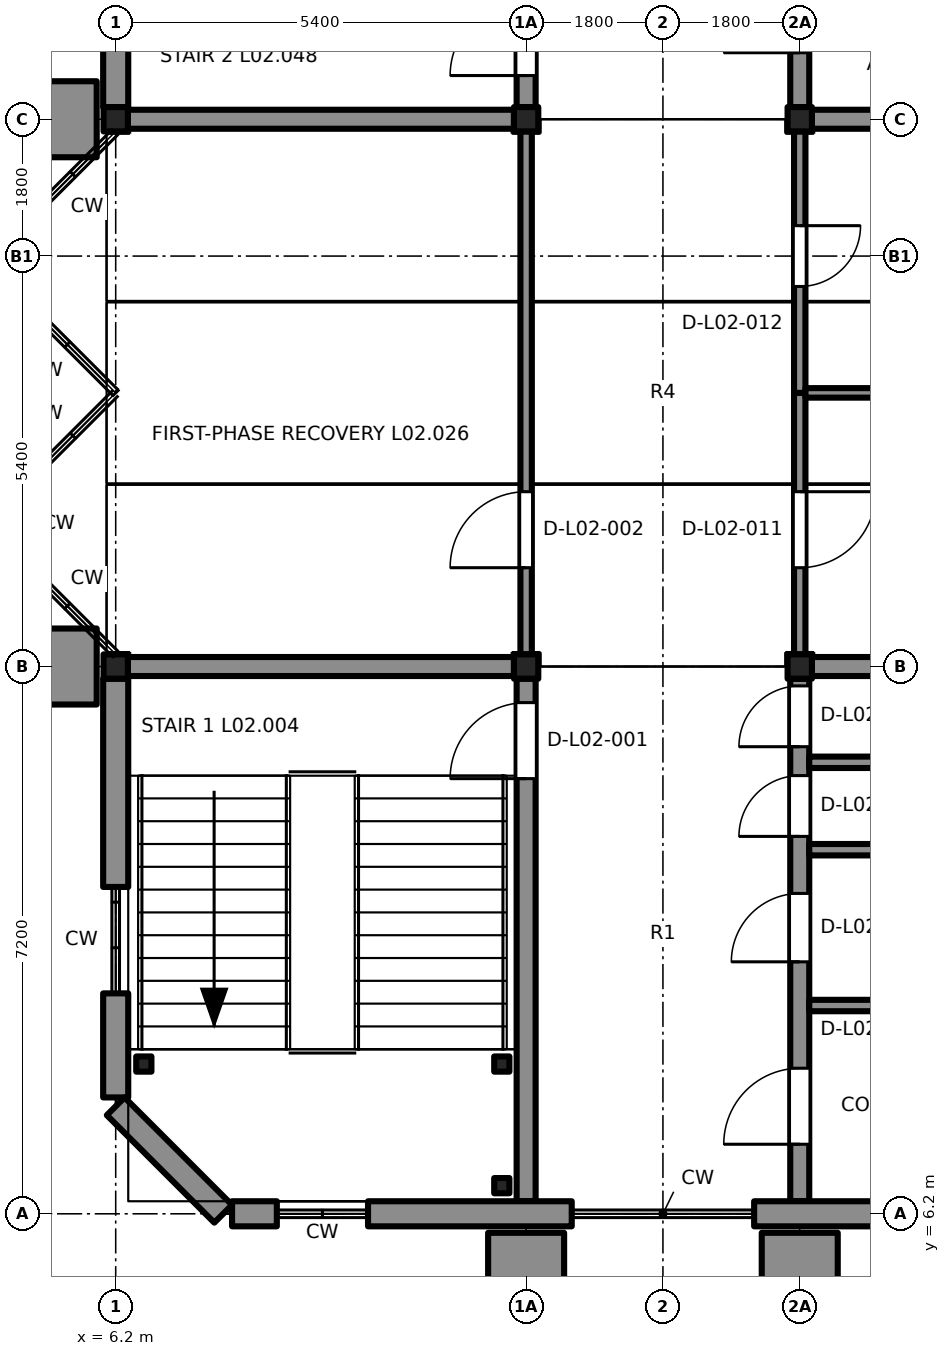
"""IFC4 building model, lengths in metres.
Left out: names, types, materials, properties, quantities, classifications, styles, units other than length and angle.
Written with IfcOpenShell. Run it as: python <this file> out.ifc"""

import sys

from ifc_helpers import new_model, si_unit, direction, frame, frame_2d, origin, origin_2d, place, context, subcontext, project, spatial, rectangle, extrude, element, fill, save


model = new_model("IFC4")
c1 = context("Model", 3, precision=1e-05, world=origin(), true_north=direction((0.0, 1.0)))
c2 = subcontext(c1, "Body", "Model", "MODEL_VIEW")
j1 = project(units=[si_unit("LENGTHUNIT", "METRE"), si_unit("PLANEANGLEUNIT", "RADIAN")], contexts=[c1])
p1 = place(None, origin())
s1 = spatial("IfcSite", under=j1, at=p1, CompositionType="ELEMENT")
p2 = place(p1, origin())
s2 = spatial("IfcBuilding", under=s1, at=p2, CompositionType="ELEMENT")
p3 = place(p2, frame((0.0, 0.0, 10.2)))
s3 = spatial("IfcBuildingStorey", under=s2, at=p3, CompositionType="ELEMENT", Elevation=10.2)
for number, where, z_axis, x_axis in (
    (1, (6.2, 13.4, 0.0), (0.0, 0.0, 1.0), (1.0, 0.0, 0.0)),
    (2, (11.6, 13.4, 0.0), (0.0, 0.0, 1.0), (1.0, 0.0, 0.0)),
    (3, (15.2, 13.4, 0.0), (0.0, 0.0, 1.0), (1.0, 0.0, 0.0)),
    (4, (6.2, 20.6, 0.0), (0.0, 0.0, 1.0), (1.0, 0.0, 0.0)),
    (5, (11.6, 20.6, 0.0), (0.0, 0.0, 1.0), (1.0, 0.0, 0.0)),
    (6, (15.2, 20.6, 0.0), (0.0, 0.0, 1.0), (1.0, 0.0, 0.0)),
):
    element("IfcColumn", number, at=place(p3, frame(where, z_axis=z_axis, x_axis=x_axis)), inside=s3, PredefinedType="COLUMN", context=c2, shape_type="SweptSolid", body=[
        extrude(rectangle(XDim=0.32, YDim=0.32, at=origin_2d()), origin(), (0.0, 0.0, 1.0), 3.9),
    ])
p4 = place(p3, frame((11.6, 6.365, 0.0), z_axis=(0.0, 0.0, 1.0), x_axis=(0.0, 1.0, 0.0)))
e7 = element("IfcWall", 7, at=p4, inside=s3, PredefinedType="SHEAR", context=c2, shape_type="SweptSolid", body=[
    extrude(rectangle(XDim=6.875, YDim=0.25, at=frame_2d((3.438, 0.0))), origin(), (0.0, 0.0, 1.0), 3.65),
])
p5 = place(p4, frame((5.56, 0.0, 0.0)))
e8 = element("IfcOpeningElement", 8, at=p5, cuts=e7, PredefinedType="OPENING", context=c2, shape_type="SweptSolid", body=[
    extrude(rectangle(XDim=1.0, YDim=2.1, at=frame_2d((0.5, 1.05))), frame((0.0, 0.135, 0.0), z_axis=(0.0, -1.0, 0.0), x_axis=(1.0, 0.0, 0.0)), (0.0, 0.0, 1.0), 0.27),
])
p6 = place(p3, frame((6.36, 13.4, 0.0), z_axis=(0.0, 0.0, 1.0), x_axis=(1.0, 0.0, 0.0)))
e9 = element("IfcWall", 9, at=p6, inside=s3, PredefinedType="SHEAR", context=c2, shape_type="SweptSolid", body=[
    extrude(rectangle(XDim=5.08, YDim=0.25, at=frame_2d((2.54, 0.0))), origin(), (0.0, 0.0, 1.0), 3.65),
])
p7 = place(p3, frame((15.2, 6.365, 0.0), z_axis=(0.0, 0.0, 1.0), x_axis=(0.0, 1.0, 0.0)))
e10 = element("IfcWall", 10, at=p7, inside=s3, PredefinedType="SHEAR", context=c2, shape_type="SweptSolid", body=[
    extrude(rectangle(XDim=6.875, YDim=0.25, at=frame_2d((3.438, 0.0))), origin(), (0.0, 0.0, 1.0), 3.65),
])
p8 = place(p7, frame((0.75, 0.0, 0.0)))
e11 = element("IfcOpeningElement", 11, at=p8, cuts=e10, PredefinedType="OPENING", context=c2, shape_type="SweptSolid", body=[
    extrude(rectangle(XDim=1.0, YDim=2.1, at=frame_2d((0.5, 1.05))), frame((0.0, 0.135, 0.0), z_axis=(0.0, -1.0, 0.0), x_axis=(1.0, 0.0, 0.0)), (0.0, 0.0, 1.0), 0.27),
])
p9 = place(p7, frame((3.15, 0.0, 0.0)))
e12 = element("IfcOpeningElement", 12, at=p9, cuts=e10, PredefinedType="OPENING", context=c2, shape_type="SweptSolid", body=[
    extrude(rectangle(XDim=0.9, YDim=2.1, at=frame_2d((0.45, 1.05))), frame((0.0, 0.135, 0.0), z_axis=(0.0, -1.0, 0.0), x_axis=(1.0, 0.0, 0.0)), (0.0, 0.0, 1.0), 0.27),
])
p10 = place(p7, frame((4.8, 0.0, 0.0)))
e13 = element("IfcOpeningElement", 13, at=p10, cuts=e10, PredefinedType="OPENING", context=c2, shape_type="SweptSolid", body=[
    extrude(rectangle(XDim=0.8, YDim=2.1, at=frame_2d((0.4, 1.05))), frame((0.0, 0.135, 0.0), z_axis=(0.0, -1.0, 0.0), x_axis=(1.0, 0.0, 0.0)), (0.0, 0.0, 1.0), 0.27),
])
p11 = place(p7, frame((5.98, 0.0, 0.0)))
e14 = element("IfcOpeningElement", 14, at=p11, cuts=e10, PredefinedType="OPENING", context=c2, shape_type="SweptSolid", body=[
    extrude(rectangle(XDim=0.8, YDim=2.1, at=frame_2d((0.4, 1.05))), frame((0.0, 0.135, 0.0), z_axis=(0.0, -1.0, 0.0), x_axis=(1.0, 0.0, 0.0)), (0.0, 0.0, 1.0), 0.27),
])
p12 = place(p3, frame((15.36, 13.4, 0.0), z_axis=(0.0, 0.0, 1.0), x_axis=(1.0, 0.0, 0.0)))
e15 = element("IfcWall", 15, at=p12, inside=s3, PredefinedType="SHEAR", context=c2, shape_type="SweptSolid", body=[
    extrude(rectangle(XDim=5.08, YDim=0.25, at=frame_2d((2.54, 0.0))), origin(), (0.0, 0.0, 1.0), 3.65),
])
for number, where, z_axis, x_axis in (
    (16, (15.325, 8.94, 0.0), (0.0, 0.0, 1.0), (1.0, 0.0, 0.0)),
    (17, (15.325, 10.99, 0.0), (0.0, 0.0, 1.0), (1.0, 0.0, 0.0)),
    (18, (15.325, 12.14, 0.0), (0.0, 0.0, 1.0), (1.0, 0.0, 0.0)),
):
    element("IfcWall", number, at=place(p3, frame(where, z_axis=z_axis, x_axis=x_axis)), inside=s3, PredefinedType="PARTITIONING", context=c2, shape_type="SweptSolid", body=[
        extrude(rectangle(XDim=5.11, YDim=0.15, at=frame_2d((2.555, 0.0))), origin(), (0.0, 0.0, 1.0), 3.65),
    ])
for number, where, z_axis, x_axis in (
    (19, (11.28, 6.57, 0.0), (0.0, 0.0, 1.0), (1.0, 0.0, 0.0)),
    (20, (6.57, 8.17, 0.0), (0.0, 0.0, 1.0), (1.0, 0.0, 0.0)),
    (21, (11.28, 8.17, 0.0), (0.0, 0.0, 1.0), (1.0, 0.0, 0.0)),
):
    element("IfcColumn", number, at=place(p3, frame(where, z_axis=z_axis, x_axis=x_axis)), inside=s3, PredefinedType="COLUMN", context=c2, shape_type="SweptSolid", body=[
        extrude(rectangle(XDim=0.2, YDim=0.2, at=origin_2d()), origin(), (0.0, 0.0, 1.0), 1.75),
    ])
p13 = place(p3, frame((11.6, 20.76, 0.0), z_axis=(0.0, 0.0, 1.0), x_axis=(0.0, 1.0, 0.0)))
e22 = element("IfcWall", 22, at=p13, inside=s3, PredefinedType="SHEAR", context=c2, shape_type="SweptSolid", body=[
    extrude(rectangle(XDim=6.88, YDim=0.25, at=frame_2d((3.44, 0.0))), origin(), (0.0, 0.0, 1.0), 3.65),
])
p14 = place(p13, frame((0.415, 0.0, 0.0)))
e23 = element("IfcOpeningElement", 23, at=p14, cuts=e22, PredefinedType="OPENING", context=c2, shape_type="SweptSolid", body=[
    extrude(rectangle(XDim=1.0, YDim=2.1, at=frame_2d((0.5, 1.05))), frame((0.0, 0.135, 0.0), z_axis=(0.0, -1.0, 0.0), x_axis=(1.0, 0.0, 0.0)), (0.0, 0.0, 1.0), 0.27),
])
p15 = place(p3, frame((6.36, 20.6, 0.0), z_axis=(0.0, 0.0, 1.0), x_axis=(1.0, 0.0, 0.0)))
e24 = element("IfcWall", 24, at=p15, inside=s3, PredefinedType="SHEAR", context=c2, shape_type="SweptSolid", body=[
    extrude(rectangle(XDim=5.08, YDim=0.25, at=frame_2d((2.54, 0.0))), origin(), (0.0, 0.0, 1.0), 3.65),
])
p16 = place(p3, frame((15.2, 20.76, 0.0), z_axis=(0.0, 0.0, 1.0), x_axis=(0.0, 1.0, 0.0)))
e25 = element("IfcWall", 25, at=p16, inside=s3, PredefinedType="SHEAR", context=c2, shape_type="SweptSolid", body=[
    extrude(rectangle(XDim=6.88, YDim=0.25, at=frame_2d((3.44, 0.0))), origin(), (0.0, 0.0, 1.0), 3.65),
])
p17 = place(p16, frame((0.715, 0.0, 0.0)))
e26 = element("IfcOpeningElement", 26, at=p17, cuts=e25, PredefinedType="OPENING", context=c2, shape_type="SweptSolid", body=[
    extrude(rectangle(XDim=1.0, YDim=2.1, at=frame_2d((0.5, 1.05))), frame((0.0, 0.135, 0.0), z_axis=(0.0, -1.0, 0.0), x_axis=(1.0, 0.0, 0.0)), (0.0, 0.0, 1.0), 0.27),
])
p18 = place(p16, frame((3.115, 0.0, 0.0)))
e27 = element("IfcOpeningElement", 27, at=p18, cuts=e25, PredefinedType="OPENING", context=c2, shape_type="SweptSolid", body=[
    extrude(rectangle(XDim=0.9, YDim=2.1, at=frame_2d((0.45, 1.05))), frame((0.0, 0.135, 0.0), z_axis=(0.0, -1.0, 0.0), x_axis=(1.0, 0.0, 0.0)), (0.0, 0.0, 1.0), 0.27),
])
p19 = place(p16, frame((4.765, 0.0, 0.0)))
e28 = element("IfcOpeningElement", 28, at=p19, cuts=e25, PredefinedType="OPENING", context=c2, shape_type="SweptSolid", body=[
    extrude(rectangle(XDim=0.8, YDim=2.1, at=frame_2d((0.4, 1.05))), frame((0.0, 0.135, 0.0), z_axis=(0.0, -1.0, 0.0), x_axis=(1.0, 0.0, 0.0)), (0.0, 0.0, 1.0), 0.27),
])
p20 = place(p16, frame((5.965, 0.0, 0.0)))
e29 = element("IfcOpeningElement", 29, at=p20, cuts=e25, PredefinedType="OPENING", context=c2, shape_type="SweptSolid", body=[
    extrude(rectangle(XDim=0.8, YDim=2.1, at=frame_2d((0.4, 1.05))), frame((0.0, 0.135, 0.0), z_axis=(0.0, -1.0, 0.0), x_axis=(1.0, 0.0, 0.0)), (0.0, 0.0, 1.0), 0.27),
])
p21 = place(p3, frame((15.36, 20.6, 0.0), z_axis=(0.0, 0.0, 1.0), x_axis=(1.0, 0.0, 0.0)))
e30 = element("IfcWall", 30, at=p21, inside=s3, PredefinedType="SHEAR", context=c2, shape_type="SweptSolid", body=[
    extrude(rectangle(XDim=5.08, YDim=0.25, at=frame_2d((2.54, 0.0))), origin(), (0.0, 0.0, 1.0), 3.65),
])
p22 = place(p3, frame((6.2, 7.731, 0.0), z_axis=(0.0, 0.0, 1.0), x_axis=(0.0, 1.0, 0.0)))
e31 = element("IfcWall", 31, at=p22, inside=s3, PredefinedType="SOLIDWALL", context=c2, shape_type="SweptSolid", body=[
    extrude(rectangle(XDim=1.369, YDim=0.33, at=frame_2d((0.685, 0.0))), origin(), (0.0, 0.0, 1.0), 3.22),
])
for number, where, z_axis, x_axis in (
    (32, (6.2, 10.5, 0.0), (0.0, 0.0, 1.0), (0.0, 1.0, 0.0)),
    (33, (6.2, 20.76, 0.0), (0.0, 0.0, 1.0), (0.0, 1.0, 0.0)),
):
    element("IfcWall", number, at=place(p3, frame(where, z_axis=z_axis, x_axis=x_axis)), inside=s3, PredefinedType="SOLIDWALL", context=c2, shape_type="SweptSolid", body=[
        extrude(rectangle(XDim=2.74, YDim=0.33, at=frame_2d((1.37, 0.0))), origin(), (0.0, 0.0, 1.0), 3.22),
    ])
for number, where, z_axis, x_axis in (
    (34, (5.575, 12.9, 0.0), (0.0, 0.0, 1.0), (0.0, 1.0, 0.0)),
    (35, (5.575, 20.1, 0.0), (0.0, 0.0, 1.0), (0.0, 1.0, 0.0)),
):
    element("IfcWall", number, at=place(p3, frame(where, z_axis=z_axis, x_axis=x_axis)), inside=s3, PredefinedType="SOLIDWALL", context=c2, shape_type="SweptSolid", body=[
        extrude(rectangle(XDim=1.0, YDim=0.75, at=frame_2d((0.5, 0.0))), origin(), (0.0, 0.0, 1.0), 3.9),
    ])
p23 = place(p3, frame((8.32, 6.2, 0.0), z_axis=(0.0, 0.0, 1.0), x_axis=(-1.0, 0.0, 0.0)))
e36 = element("IfcWall", 36, at=p23, inside=s3, PredefinedType="SOLIDWALL", context=c2, shape_type="SweptSolid", body=[
    extrude(rectangle(XDim=0.589, YDim=0.33, at=frame_2d((0.294, 0.0))), origin(), (0.0, 0.0, 1.0), 3.2),
])
p24 = place(p3, frame((12.2, 6.2, 0.0), z_axis=(0.0, 0.0, 1.0), x_axis=(-1.0, 0.0, 0.0)))
e37 = element("IfcWall", 37, at=p24, inside=s3, PredefinedType="SOLIDWALL", context=c2, shape_type="SweptSolid", body=[
    extrude(rectangle(XDim=2.68, YDim=0.33, at=frame_2d((1.34, 0.0))), origin(), (0.0, 0.0, 1.0), 3.2),
])
p25 = place(p3, frame((20.435, 6.2, 0.0), z_axis=(0.0, 0.0, 1.0), x_axis=(-1.0, 0.0, 0.0)))
e38 = element("IfcWall", 38, at=p25, inside=s3, PredefinedType="SOLIDWALL", context=c2, shape_type="SweptSolid", body=[
    extrude(rectangle(XDim=5.835, YDim=0.33, at=frame_2d((2.917, 0.0))), origin(), (0.0, 0.0, 1.0), 3.2),
])
for number, where, z_axis, x_axis in (
    (39, (12.1, 5.575, 0.0), (0.0, 0.0, 1.0), (-1.0, 0.0, 0.0)),
    (40, (15.7, 5.575, 0.0), (0.0, 0.0, 1.0), (-1.0, 0.0, 0.0)),
):
    element("IfcWall", number, at=place(p3, frame(where, z_axis=z_axis, x_axis=x_axis)), inside=s3, PredefinedType="SOLIDWALL", context=c2, shape_type="SweptSolid", body=[
        extrude(rectangle(XDim=1.0, YDim=0.75, at=frame_2d((0.5, 0.0))), origin(), (0.0, 0.0, 1.0), 3.9),
    ])
p26 = place(p3, frame((6.2, 7.614, 0.0), z_axis=(0.0, 0.0, 1.0), x_axis=(0.707106781187, -0.707106781187, 0.0)))
e41 = element("IfcWall", 41, at=p26, inside=s3, PredefinedType="SOLIDWALL", context=c2, shape_type="SweptSolid", body=[
    extrude(rectangle(XDim=2.0, YDim=0.33, at=frame_2d((1.0, 0.0))), origin(), (0.0, 0.0, 1.0), 3.2),
])
p27 = place(p3, frame((11.6, 13.56, 0.0), z_axis=(0.0, 0.0, 1.0), x_axis=(0.0, 1.0, 0.0)))
e42 = element("IfcWall", 42, at=p27, inside=s3, PredefinedType="PARTITIONING", context=c2, shape_type="SweptSolid", body=[
    extrude(rectangle(XDim=6.88, YDim=0.15, at=frame_2d((3.44, 0.0))), origin(), (0.0, 0.0, 1.0), 3.22),
])
p28 = place(p27, frame((1.14, 0.0, 0.0)))
e43 = element("IfcOpeningElement", 43, at=p28, cuts=e42, PredefinedType="OPENING", context=c2, shape_type="SweptSolid", body=[
    extrude(rectangle(XDim=1.0, YDim=2.1, at=frame_2d((0.5, 1.05))), frame((0.0, 0.085, 0.0), z_axis=(0.0, -1.0, 0.0), x_axis=(1.0, 0.0, 0.0)), (0.0, 0.0, 1.0), 0.17),
])
p29 = place(p3, frame((15.2, 17.0, 0.0), z_axis=(0.0, 0.0, 1.0), x_axis=(0.0, -1.0, 0.0)))
e44 = element("IfcWall", 44, at=p29, inside=s3, PredefinedType="PARTITIONING", context=c2, shape_type="SweptSolid", body=[
    extrude(rectangle(XDim=3.44, YDim=0.15, at=frame_2d((1.72, 0.0))), origin(), (0.0, 0.0, 1.0), 3.22),
])
p30 = place(p29, frame((1.3, 0.0, 0.0)))
e45 = element("IfcOpeningElement", 45, at=p30, cuts=e44, PredefinedType="OPENING", context=c2, shape_type="SweptSolid", body=[
    extrude(rectangle(XDim=1.0, YDim=2.1, at=frame_2d((0.5, 1.05))), frame((0.0, 0.085, 0.0), z_axis=(0.0, -1.0, 0.0), x_axis=(1.0, 0.0, 0.0)), (0.0, 0.0, 1.0), 0.17),
])
p31 = place(p3, frame((15.2, 20.44, 0.0), z_axis=(0.0, 0.0, 1.0), x_axis=(0.0, -1.0, 0.0)))
e46 = element("IfcWall", 46, at=p31, inside=s3, PredefinedType="PARTITIONING", context=c2, shape_type="SweptSolid", body=[
    extrude(rectangle(XDim=3.44, YDim=0.15, at=frame_2d((1.72, 0.0))), origin(), (0.0, 0.0, 1.0), 3.22),
])
p32 = place(p31, frame((1.24, 0.0, 0.0)))
e47 = element("IfcOpeningElement", 47, at=p32, cuts=e46, PredefinedType="OPENING", context=c2, shape_type="SweptSolid", body=[
    extrude(rectangle(XDim=0.8, YDim=2.1, at=frame_2d((0.4, 1.05))), frame((0.0, 0.085, 0.0), z_axis=(0.0, -1.0, 0.0), x_axis=(1.0, 0.0, 0.0)), (0.0, 0.0, 1.0), 0.17),
])
p33 = place(p3, frame((20.435, 17.0, 0.0), z_axis=(0.0, 0.0, 1.0), x_axis=(-1.0, 0.0, 0.0)))
e48 = element("IfcWall", 48, at=p33, inside=s3, PredefinedType="PARTITIONING", context=c2, shape_type="SweptSolid", body=[
    extrude(rectangle(XDim=5.16, YDim=0.125, at=frame_2d((2.58, 0.0))), origin(), (0.0, 0.0, 1.0), 3.38),
])
p34 = place(p5, origin())
e49 = element("IfcDoor", 49, at=p34, inside=s3, OperationType="SINGLE_SWING_LEFT", PredefinedType="DOOR", context=c2, shape_type="SweptSolid", body=[
    extrude(rectangle(XDim=1.0, YDim=2.1, at=frame_2d((0.5, 1.05))), frame((0.0, 0.025, 0.0), z_axis=(0.0, -1.0, 0.0), x_axis=(1.0, 0.0, 0.0)), (0.0, 0.0, 1.0), 0.05),
])
fill(e8, e49)
p35 = place(p8, origin())
e50 = element("IfcDoor", 50, at=p35, inside=s3, OperationType="SINGLE_SWING_LEFT", PredefinedType="DOOR", context=c2, shape_type="SweptSolid", body=[
    extrude(rectangle(XDim=1.0, YDim=2.1, at=frame_2d((0.5, 1.05))), frame((0.0, 0.025, 0.0), z_axis=(0.0, -1.0, 0.0), x_axis=(1.0, 0.0, 0.0)), (0.0, 0.0, 1.0), 0.05),
])
fill(e11, e50)
p36 = place(p9, origin())
e51 = element("IfcDoor", 51, at=p36, inside=s3, OperationType="SINGLE_SWING_LEFT", PredefinedType="DOOR", context=c2, shape_type="SweptSolid", body=[
    extrude(rectangle(XDim=0.9, YDim=2.1, at=frame_2d((0.45, 1.05))), frame((0.0, 0.025, 0.0), z_axis=(0.0, -1.0, 0.0), x_axis=(1.0, 0.0, 0.0)), (0.0, 0.0, 1.0), 0.05),
])
fill(e12, e51)
p37 = place(p10, origin())
e52 = element("IfcDoor", 52, at=p37, inside=s3, OperationType="SINGLE_SWING_LEFT", PredefinedType="DOOR", context=c2, shape_type="SweptSolid", body=[
    extrude(rectangle(XDim=0.8, YDim=2.1, at=frame_2d((0.4, 1.05))), frame((0.0, 0.025, 0.0), z_axis=(0.0, -1.0, 0.0), x_axis=(1.0, 0.0, 0.0)), (0.0, 0.0, 1.0), 0.05),
])
fill(e13, e52)
p38 = place(p11, origin())
e53 = element("IfcDoor", 53, at=p38, inside=s3, OperationType="SINGLE_SWING_LEFT", PredefinedType="DOOR", context=c2, shape_type="SweptSolid", body=[
    extrude(rectangle(XDim=0.8, YDim=2.1, at=frame_2d((0.4, 1.05))), frame((0.0, 0.025, 0.0), z_axis=(0.0, -1.0, 0.0), x_axis=(1.0, 0.0, 0.0)), (0.0, 0.0, 1.0), 0.05),
])
fill(e14, e53)
p39 = place(p14, origin())
e54 = element("IfcDoor", 54, at=p39, inside=s3, OperationType="SINGLE_SWING_RIGHT", PredefinedType="DOOR", context=c2, shape_type="SweptSolid", body=[
    extrude(rectangle(XDim=1.0, YDim=2.1, at=frame_2d((0.5, 1.05))), frame((0.0, 0.025, 0.0), z_axis=(0.0, -1.0, 0.0), x_axis=(1.0, 0.0, 0.0)), (0.0, 0.0, 1.0), 0.05),
])
fill(e23, e54)
p40 = place(p28, origin())
e55 = element("IfcDoor", 55, at=p40, inside=s3, OperationType="SINGLE_SWING_LEFT", PredefinedType="DOOR", context=c2, shape_type="SweptSolid", body=[
    extrude(rectangle(XDim=1.0, YDim=2.1, at=frame_2d((0.5, 1.05))), frame((0.0, 0.025, 0.0), z_axis=(0.0, -1.0, 0.0), x_axis=(1.0, 0.0, 0.0)), (0.0, 0.0, 1.0), 0.05),
])
fill(e43, e55)
p41 = place(p30, origin())
e56 = element("IfcDoor", 56, at=p41, inside=s3, OperationType="SINGLE_SWING_RIGHT", PredefinedType="DOOR", context=c2, shape_type="SweptSolid", body=[
    extrude(rectangle(XDim=1.0, YDim=2.1, at=frame_2d((0.5, 1.05))), frame((0.0, 0.025, 0.0), z_axis=(0.0, -1.0, 0.0), x_axis=(1.0, 0.0, 0.0)), (0.0, 0.0, 1.0), 0.05),
])
fill(e45, e56)
p42 = place(p32, origin())
e57 = element("IfcDoor", 57, at=p42, inside=s3, OperationType="SINGLE_SWING_LEFT", PredefinedType="DOOR", context=c2, shape_type="SweptSolid", body=[
    extrude(rectangle(XDim=0.8, YDim=2.1, at=frame_2d((0.4, 1.05))), frame((0.0, 0.025, 0.0), z_axis=(0.0, -1.0, 0.0), x_axis=(1.0, 0.0, 0.0)), (0.0, 0.0, 1.0), 0.05),
])
fill(e47, e57)
save(model, sys.argv[1])
